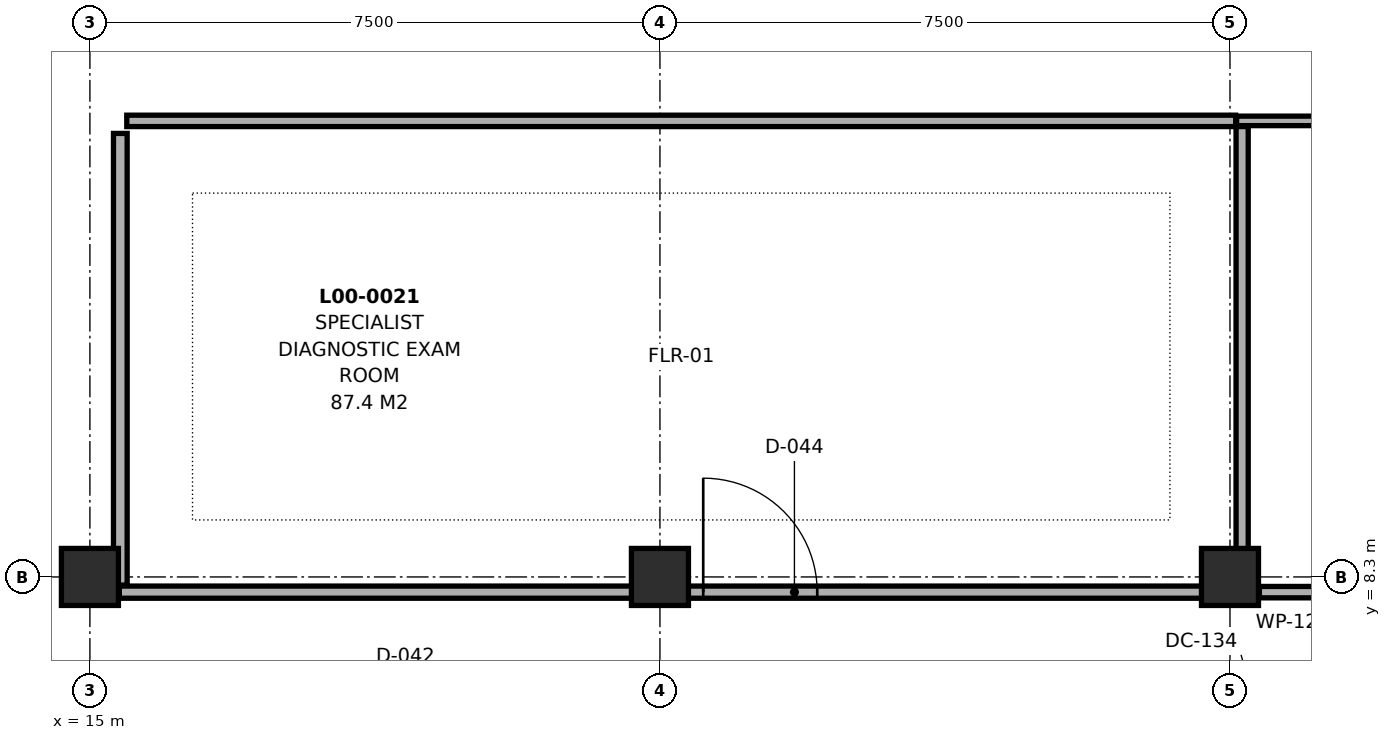
"""IFC4 building model, lengths in metres.
Left out: names, types, materials, properties, quantities, classifications, styles, units other than length and angle.
Written with IfcOpenShell. Run it as: python <this file> out.ifc"""

import sys

from ifc_helpers import new_model, si_unit, direction, frame, frame_2d, origin, origin_2d, place, context, subcontext, project, spatial, rectangle, extrude, element, fill, save


model = new_model("IFC4")
c1 = context("Model", 3, precision=1e-05, world=origin(), true_north=direction((0.0, 1.0)))
c2 = subcontext(c1, "Body", "Model", "MODEL_VIEW")
j1 = project(units=[si_unit("LENGTHUNIT", "METRE"), si_unit("PLANEANGLEUNIT", "RADIAN")], contexts=[c1])
p1 = place(None, origin())
s1 = spatial("IfcSite", under=j1, at=p1, CompositionType="ELEMENT")
p2 = place(p1, origin())
s2 = spatial("IfcBuilding", under=s1, at=p2, CompositionType="ELEMENT")
p3 = place(p2, origin())
s3 = spatial("IfcBuildingStorey", under=s2, at=p3, CompositionType="ELEMENT", Elevation=0.0)
for number, where, z_axis, x_axis in (
    (1, (15.0, 8.3, 0.0), (0.0, 0.0, 1.0), (1.0, 0.0, 0.0)),
    (2, (22.5, 8.3, 0.0), (0.0, 0.0, 1.0), (1.0, 0.0, 0.0)),
    (3, (30.0, 8.3, 0.0), (0.0, 0.0, 1.0), (1.0, 0.0, 0.0)),
):
    element("IfcColumn", number, at=place(p3, frame(where, z_axis=z_axis, x_axis=x_axis)), inside=s3, PredefinedType="COLUMN", context=c2, shape_type="SweptSolid", body=[
        extrude(rectangle(XDim=0.75, YDim=0.75, at=origin_2d()), origin(), (0.0, 0.0, 1.0), 4.7),
    ])
p4 = place(p3, frame((15.387, 8.1, 0.0), z_axis=(0.0, 0.0, 1.0), x_axis=(1.0, 0.0, 0.0)))
e4 = element("IfcWall", 4, at=p4, inside=s3, PredefinedType="PARTITIONING", context=c2, shape_type="SweptSolid", body=[
    extrude(rectangle(XDim=14.521, YDim=0.16, at=frame_2d((7.26, 0.0))), origin(), (0.0, 0.0, 1.0), 3.765),
])
p5 = place(p4, frame((7.682, 0.0, 0.0)))
e5 = element("IfcOpeningElement", 5, at=p5, cuts=e4, PredefinedType="OPENING", context=c2, shape_type="SweptSolid", body=[
    extrude(rectangle(XDim=1.5, YDim=2.28, at=frame_2d((0.75, 1.14))), frame((0.0, 0.092, 0.0), z_axis=(0.0, -1.0, 0.0), x_axis=(1.0, 0.0, 0.0)), (0.0, 0.0, 1.0), 0.184),
])
p6 = place(p3, frame((30.387, 8.1, 0.0), z_axis=(0.0, 0.0, 1.0), x_axis=(1.0, 0.0, 0.0)))
e6 = element("IfcWall", 6, at=p6, inside=s3, PredefinedType="PARTITIONING", context=c2, shape_type="SweptSolid", body=[
    extrude(rectangle(XDim=14.281, YDim=0.15, at=frame_2d((7.141, 0.0))), origin(), (0.0, 0.0, 1.0), 3.985),
])
p7 = place(p6, frame((7.887, 0.0, 0.0)))
e7 = element("IfcOpeningElement", 7, at=p7, cuts=e6, PredefinedType="OPENING", context=c2, shape_type="SweptSolid", body=[
    extrude(rectangle(XDim=1.56, YDim=2.3, at=frame_2d((0.78, 1.15))), frame((0.0, 0.087, 0.0), z_axis=(0.0, -1.0, 0.0), x_axis=(1.0, 0.0, 0.0)), (0.0, 0.0, 1.0), 0.174),
])
p8 = place(p3, frame((15.485, 14.3, 0.0), z_axis=(0.0, 0.0, 1.0), x_axis=(1.0, 0.0, 0.0)))
e8 = element("IfcWall", 8, at=p8, inside=s3, PredefinedType="PARTITIONING", context=c2, shape_type="SweptSolid", body=[
    extrude(rectangle(XDim=14.59, YDim=0.15, at=frame_2d((7.295, 0.0))), origin(), (0.0, 0.0, 1.0), 3.765),
])
p9 = place(p3, frame((30.087, 14.3, 0.0), z_axis=(0.0, 0.0, 1.0), x_axis=(1.0, 0.0, 0.0)))
e9 = element("IfcWall", 9, at=p9, inside=s3, PredefinedType="PARTITIONING", context=c2, shape_type="SweptSolid", body=[
    extrude(rectangle(XDim=14.748, YDim=0.125, at=frame_2d((7.374, 0.0))), origin(), (0.0, 0.0, 1.0), 3.985),
])
p10 = place(p3, frame((15.4, 8.192, 0.0), z_axis=(0.0, 0.0, 1.0), x_axis=(0.0, 1.0, 0.0)))
e10 = element("IfcWall", 10, at=p10, inside=s3, PredefinedType="PARTITIONING", context=c2, shape_type="SweptSolid", body=[
    extrude(rectangle(XDim=5.943, YDim=0.18, at=frame_2d((2.972, 0.0))), origin(), (0.0, 0.0, 1.0), 3.765),
])
p11 = place(p3, frame((30.16, 8.432, 0.0), z_axis=(0.0, 0.0, 1.0), x_axis=(0.0, 1.0, 0.0)))
e11 = element("IfcWall", 11, at=p11, inside=s3, PredefinedType="PARTITIONING", context=c2, shape_type="SweptSolid", body=[
    extrude(rectangle(XDim=5.794, YDim=0.16, at=frame_2d((2.897, 0.0))), origin(), (0.0, 0.0, 1.0), 3.985),
])
p12 = place(p5, origin())
e12 = element("IfcDoor", 12, at=p12, inside=s3, OperationType="SINGLE_SWING_LEFT", PredefinedType="DOOR", context=c2, shape_type="SweptSolid", body=[
    extrude(rectangle(XDim=1.5, YDim=2.28, at=frame_2d((0.75, 1.14))), frame((0.0, 0.025, 0.0), z_axis=(0.0, -1.0, 0.0), x_axis=(1.0, 0.0, 0.0)), (0.0, 0.0, 1.0), 0.05),
])
fill(e5, e12)
save(model, sys.argv[1])
